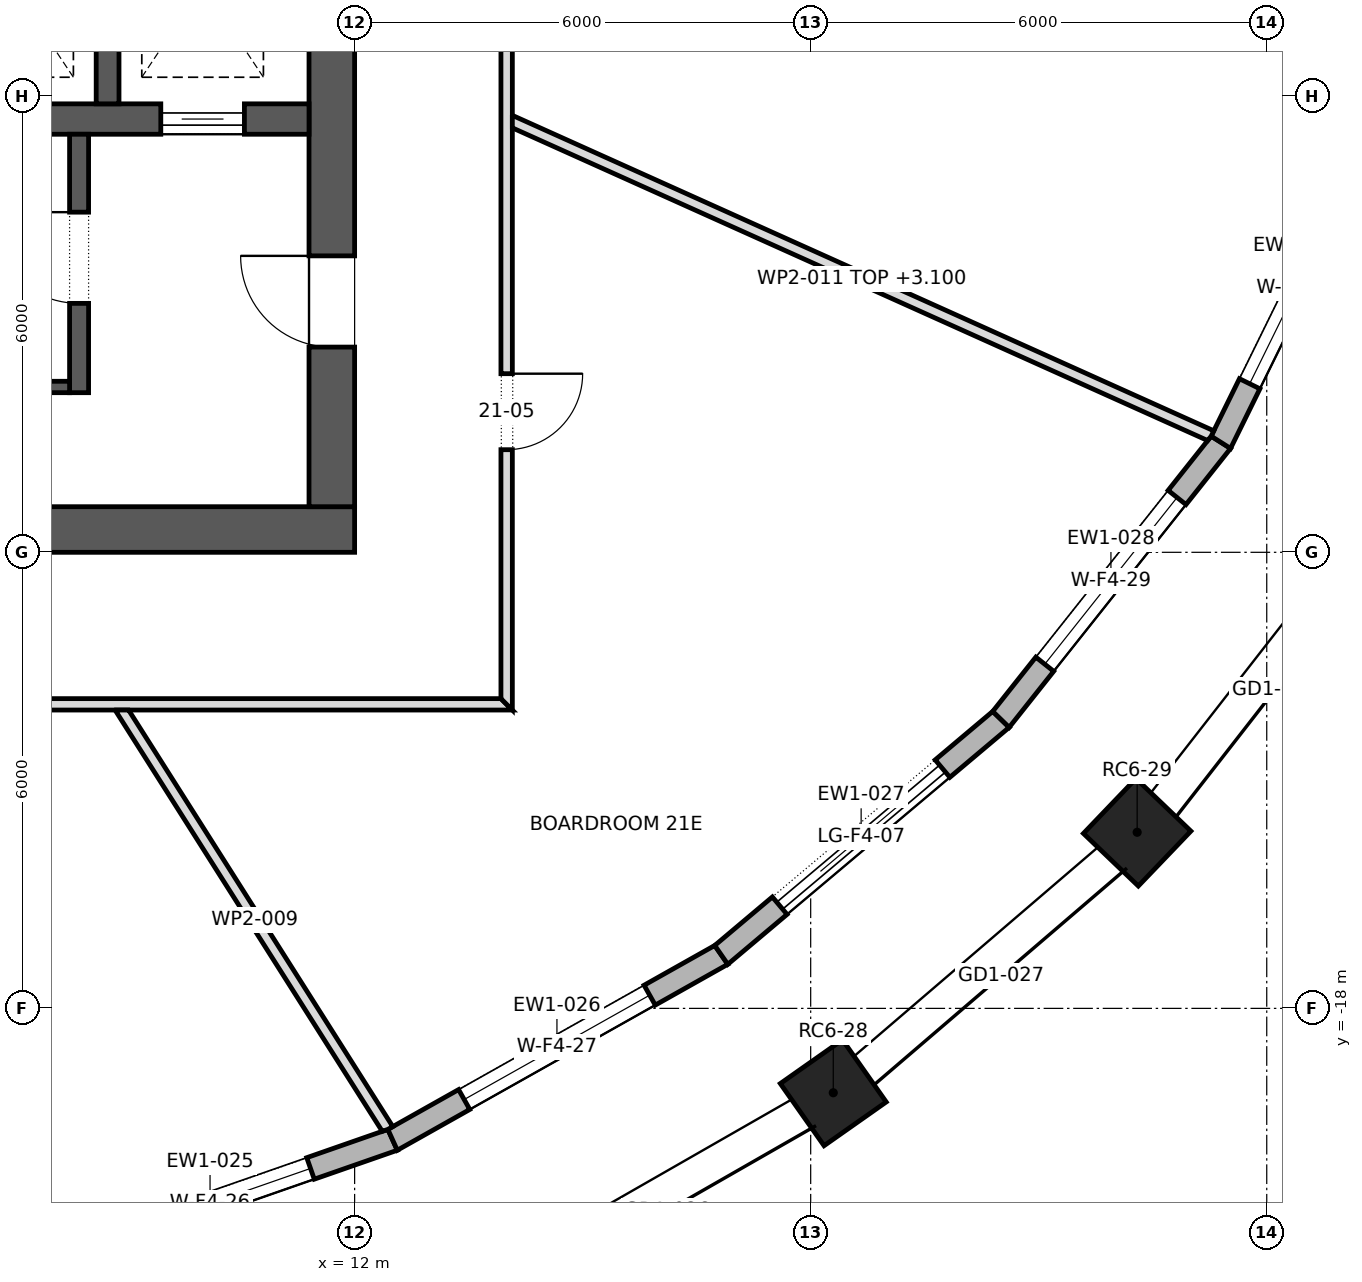
"""IFC4 building model, lengths in metres.
Left out: names, types, materials, properties, quantities, classifications, styles, units other than length and angle.
Written with IfcOpenShell. Run it as: python <this file> out.ifc"""

import sys

from ifc_helpers import new_model, si_unit, direction, frame, frame_2d, origin, origin_2d, place, context, subcontext, project, spatial, polyline, rectangle, outline, extrude, element, fill, save


model = new_model("IFC4")
c1 = context("Model", 3, precision=1e-05, world=origin(), true_north=direction((0.0, 1.0)))
c2 = subcontext(c1, "Body", "Model", "MODEL_VIEW")
j1 = project(units=[si_unit("LENGTHUNIT", "METRE"), si_unit("PLANEANGLEUNIT", "RADIAN")], contexts=[c1])
p1 = place(None, origin())
s1 = spatial("IfcSite", under=j1, at=p1, CompositionType="ELEMENT")
p2 = place(p1, origin())
s2 = spatial("IfcBuilding", under=s1, at=p2, CompositionType="ELEMENT")
p3 = place(p2, frame((0.0, 0.0, 300.3)))
s3 = spatial("IfcBuildingStorey", under=s2, at=p3, CompositionType="ELEMENT", Elevation=300.3)
for number, where, z_axis, x_axis in (
    (1, (18.297, -19.11, 0.0), (0.0, 0.0, 1.0), (0.818, 0.575, 0.0)),
    (2, (22.295, -15.683, 0.0), (0.0, 0.0, 1.0), (0.692, 0.722, 0.0)),
):
    element("IfcColumn", number, at=place(p3, frame(where, z_axis=z_axis, x_axis=x_axis)), inside=s3, PredefinedType="COLUMN", context=c2, shape_type="SweptSolid", body=[
        extrude(rectangle(XDim=1.0, YDim=1.0, at=origin_2d()), origin(), (0.0, 0.0, 1.0), 4.0),
    ])
p4 = place(p3, frame((-12.0, -11.7, 0.0), z_axis=(0.0, 0.0, 1.0), x_axis=(1.0, 0.0, 0.0)))
e3 = element("IfcWall", 3, at=p4, inside=s3, PredefinedType="SHEAR", context=c2, shape_type="SweptSolid", body=[
    extrude(rectangle(XDim=24.0, YDim=0.6, at=frame_2d((12.0, 0.0))), origin(), (0.0, 0.0, 1.0), 4.0),
])
p5 = place(p4, frame((9.975, 0.0, 0.0)))
e4 = element("IfcOpeningElement", 4, at=p5, cuts=e3, PredefinedType="OPENING", context=c2, shape_type="SweptSolid", body=[
    extrude(rectangle(XDim=0.9, YDim=2.1, at=frame_2d((0.45, 1.05))), frame((0.0, 0.312, 0.0), z_axis=(0.0, -1.0, 0.0), x_axis=(1.0, 0.0, 0.0)), (0.0, 0.0, 1.0), 0.624),
])
p6 = place(p4, frame((4.6, 0.0, 0.0)))
e5 = element("IfcOpeningElement", 5, at=p6, cuts=e3, PredefinedType="OPENING", context=c2, shape_type="SweptSolid", body=[
    extrude(rectangle(XDim=0.8, YDim=2.1, at=frame_2d((0.4, 1.05))), frame((0.0, 0.312, 0.0), z_axis=(0.0, -1.0, 0.0), x_axis=(1.0, 0.0, 0.0)), (0.0, 0.0, 1.0), 0.624),
])
p7 = place(p4, frame((7.0, 0.0, 0.0)))
e6 = element("IfcOpeningElement", 6, at=p7, cuts=e3, PredefinedType="OPENING", context=c2, shape_type="SweptSolid", body=[
    extrude(rectangle(XDim=0.8, YDim=2.1, at=frame_2d((0.4, 1.05))), frame((0.0, 0.312, 0.0), z_axis=(0.0, -1.0, 0.0), x_axis=(1.0, 0.0, 0.0)), (0.0, 0.0, 1.0), 0.624),
])
p8 = place(p4, frame((15.85, 0.0, 0.0)))
e7 = element("IfcOpeningElement", 7, at=p8, cuts=e3, PredefinedType="OPENING", context=c2, shape_type="SweptSolid", body=[
    extrude(rectangle(XDim=0.8, YDim=2.1, at=frame_2d((0.4, 1.05))), frame((0.0, 0.312, 0.0), z_axis=(0.0, -1.0, 0.0), x_axis=(1.0, 0.0, 0.0)), (0.0, 0.0, 1.0), 0.624),
])
p9 = place(p3, frame((11.7, -11.4, 0.0), z_axis=(0.0, 0.0, 1.0), x_axis=(0.0, 1.0, 0.0)))
e8 = element("IfcWall", 8, at=p9, inside=s3, PredefinedType="SHEAR", context=c2, shape_type="SweptSolid", body=[
    extrude(rectangle(XDim=22.8, YDim=0.6, at=frame_2d((11.4, 0.0))), origin(), (0.0, 0.0, 1.0), 4.0),
])
p10 = place(p9, frame((10.2, 0.0, 0.0)))
e9 = element("IfcOpeningElement", 9, at=p10, cuts=e8, PredefinedType="OPENING", context=c2, shape_type="SweptSolid", body=[
    extrude(rectangle(XDim=2.4, YDim=2.1, at=frame_2d((1.2, 1.05))), frame((0.0, 0.312, 0.0), z_axis=(0.0, -1.0, 0.0), x_axis=(1.0, 0.0, 0.0)), (0.0, 0.0, 1.0), 0.624),
])
p11 = place(p9, frame((19.5, 0.0, 0.0)))
e10 = element("IfcOpeningElement", 10, at=p11, cuts=e8, PredefinedType="OPENING", context=c2, shape_type="SweptSolid", body=[
    extrude(rectangle(XDim=1.2, YDim=2.1, at=frame_2d((0.6, 1.05))), frame((0.0, 0.312, 0.0), z_axis=(0.0, -1.0, 0.0), x_axis=(1.0, 0.0, 0.0)), (0.0, 0.0, 1.0), 0.624),
])
p12 = place(p9, frame((2.1, 0.0, 0.0)))
e11 = element("IfcOpeningElement", 11, at=p12, cuts=e8, PredefinedType="OPENING", context=c2, shape_type="SweptSolid", body=[
    extrude(rectangle(XDim=1.2, YDim=2.1, at=frame_2d((0.6, 1.05))), frame((0.0, 0.312, 0.0), z_axis=(0.0, -1.0, 0.0), x_axis=(1.0, 0.0, 0.0)), (0.0, 0.0, 1.0), 0.624),
])
p13 = place(p3, frame((-11.4, -6.3, 0.0), z_axis=(0.0, 0.0, 1.0), x_axis=(1.0, 0.0, 0.0)))
e12 = element("IfcWall", 12, at=p13, inside=s3, PredefinedType="SHEAR", context=c2, shape_type="SweptSolid", body=[
    extrude(rectangle(XDim=22.8, YDim=0.4, at=frame_2d((11.4, 0.0))), origin(), (0.0, 0.0, 1.0), 4.0),
])
p14 = place(p13, frame((20.85, 0.0, 0.0)))
e13 = element("IfcOpeningElement", 13, at=p14, cuts=e12, PredefinedType="OPENING", context=c2, shape_type="SweptSolid", body=[
    extrude(rectangle(XDim=1.1, YDim=2.1, at=frame_2d((0.55, 1.05))), frame((0.0, 0.212, 0.0), z_axis=(0.0, -1.0, 0.0), x_axis=(1.0, 0.0, 0.0)), (0.0, 0.0, 1.0), 0.424),
])
p15 = place(p3, frame((8.75, -6.1, 0.0), z_axis=(0.0, 0.0, 1.0), x_axis=(0.0, 1.0, 0.0)))
e14 = element("IfcWall", 14, at=p15, inside=s3, PredefinedType="SHEAR", context=c2, shape_type="SweptSolid", body=[
    extrude(rectangle(XDim=2.9, YDim=0.3, at=frame_2d((1.45, 0.0))), origin(), (0.0, 0.0, 1.0), 4.0),
])
p16 = place(p3, frame((7.696, -21.404, 0.0), z_axis=(0.0, 0.0, 1.0), x_axis=(0.944230376095, 0.329285585564, 0.0)))
e15 = element("IfcWall", 15, at=p16, inside=s3, PredefinedType="STANDARD", context=c2, shape_type="SweptSolid", body=[
    extrude(outline(polyline([(-0.013, -0.15), (5.1, -0.15), (5.073, 0.15), (0.013, 0.15), (-0.013, -0.15)])), origin(), (0.0, 0.0, 1.0), 3.7),
])
p17 = place(p16, frame((1.143, 0.0, 0.6)))
e16 = element("IfcOpeningElement", 16, at=p17, cuts=e15, PredefinedType="OPENING", context=c2, shape_type="SweptSolid", body=[
    extrude(rectangle(XDim=2.8, YDim=2.65, at=frame_2d((1.4, 1.325))), frame((0.0, 0.162, 0.0), z_axis=(0.0, -1.0, 0.0), x_axis=(1.0, 0.0, 0.0)), (0.0, 0.0, 1.0), 0.324),
])
p18 = place(p3, frame((12.5, -19.729, 0.0), z_axis=(0.0, 0.0, 1.0), x_axis=(0.871512454536, 0.490373369575, 0.0)))
e17 = element("IfcWall", 17, at=p18, inside=s3, PredefinedType="STANDARD", context=c2, shape_type="SweptSolid", body=[
    extrude(outline(polyline([(-0.013, -0.15), (4.976, -0.15), (4.948, 0.15), (0.013, 0.15), (-0.013, -0.15)])), origin(), (0.0, 0.0, 1.0), 3.7),
])
p19 = place(p18, frame((1.081, 0.0, 0.6)))
e18 = element("IfcOpeningElement", 18, at=p19, cuts=e17, PredefinedType="OPENING", context=c2, shape_type="SweptSolid", body=[
    extrude(rectangle(XDim=2.8, YDim=2.65, at=frame_2d((1.4, 1.325))), frame((0.0, 0.162, 0.0), z_axis=(0.0, -1.0, 0.0), x_axis=(1.0, 0.0, 0.0)), (0.0, 0.0, 1.0), 0.324),
])
p20 = place(p3, frame((16.824, -17.296, 0.0), z_axis=(0.0, 0.0, 1.0), x_axis=(0.764966473721, 0.644070100286, 0.0)))
e19 = element("IfcWall", 19, at=p20, inside=s3, PredefinedType="STANDARD", context=c2, shape_type="SweptSolid", body=[
    extrude(outline(polyline([(-0.014, -0.15), (4.825, -0.15), (4.795, 0.15), (0.014, 0.15), (-0.014, -0.15)])), origin(), (0.0, 0.0, 1.0), 3.7),
])
p21 = place(p20, frame((1.005, 0.0, 0.0)))
e20 = element("IfcOpeningElement", 20, at=p21, cuts=e19, PredefinedType="OPENING", context=c2, shape_type="SweptSolid", body=[
    extrude(rectangle(XDim=2.8, YDim=3.25, at=frame_2d((1.4, 1.625))), frame((0.0, 0.162, 0.0), z_axis=(0.0, -1.0, 0.0), x_axis=(1.0, 0.0, 0.0)), (0.0, 0.0, 1.0), 0.324),
])
p22 = place(p3, frame((20.503, -14.198, 0.0), z_axis=(0.0, 0.0, 1.0), x_axis=(0.621625671247, 0.783314448256, 0.0)))
e21 = element("IfcWall", 21, at=p22, inside=s3, PredefinedType="STANDARD", context=c2, shape_type="SweptSolid", body=[
    extrude(outline(polyline([(-0.015, -0.15), (4.67, -0.15), (4.637, 0.15), (0.015, 0.15), (-0.015, -0.15)])), origin(), (0.0, 0.0, 1.0), 3.7),
])
p23 = place(p22, frame((0.927, 0.0, 0.6)))
e22 = element("IfcOpeningElement", 22, at=p23, cuts=e21, PredefinedType="OPENING", context=c2, shape_type="SweptSolid", body=[
    extrude(rectangle(XDim=2.8, YDim=2.65, at=frame_2d((1.4, 1.325))), frame((0.0, 0.162, 0.0), z_axis=(0.0, -1.0, 0.0), x_axis=(1.0, 0.0, 0.0)), (0.0, 0.0, 1.0), 0.324),
])
p24 = place(p3, frame((23.396, -10.553, 0.0), z_axis=(0.0, 0.0, 1.0), x_axis=(0.441431671743, 0.897294867467, 0.0)))
e23 = element("IfcWall", 23, at=p24, inside=s3, PredefinedType="STANDARD", context=c2, shape_type="SweptSolid", body=[
    extrude(outline(polyline([(-0.016, -0.15), (4.534, -0.15), (4.5, 0.15), (0.016, 0.15), (-0.016, -0.15)])), origin(), (0.0, 0.0, 1.0), 3.7),
])
p25 = place(p24, frame((0.858, 0.0, 0.6)))
e24 = element("IfcOpeningElement", 24, at=p25, cuts=e23, PredefinedType="OPENING", context=c2, shape_type="SweptSolid", body=[
    extrude(rectangle(XDim=2.8, YDim=2.65, at=frame_2d((1.4, 1.325))), frame((0.0, 0.162, 0.0), z_axis=(0.0, -1.0, 0.0), x_axis=(1.0, 0.0, 0.0)), (0.0, 0.0, 1.0), 0.324),
])
p26 = place(p3, frame((8.375, -9.9, 0.0), z_axis=(0.0, 0.0, 1.0), x_axis=(0.0, 1.0, 0.0)))
e25 = element("IfcWall", 25, at=p26, inside=s3, PredefinedType="SHEAR", context=c2, shape_type="SweptSolid", body=[
    extrude(rectangle(XDim=3.4, YDim=0.25, at=frame_2d((1.7, 0.0))), origin(), (0.0, 0.0, 1.0), 3.7),
])
p27 = place(p26, frame((1.175, 0.0, 0.0)))
e26 = element("IfcOpeningElement", 26, at=p27, cuts=e25, PredefinedType="OPENING", context=c2, shape_type="SweptSolid", body=[
    extrude(rectangle(XDim=1.2, YDim=2.1, at=frame_2d((0.6, 1.05))), frame((0.0, 0.137, 0.0), z_axis=(0.0, -1.0, 0.0), x_axis=(1.0, 0.0, 0.0)), (0.0, 0.0, 1.0), 0.274),
])
p28 = place(p3, frame((0.25, -9.825, 0.0), z_axis=(0.0, 0.0, 1.0), x_axis=(1.0, 0.0, 0.0)))
e27 = element("IfcWall", 27, at=p28, inside=s3, PredefinedType="SHEAR", context=c2, shape_type="SweptSolid", body=[
    extrude(rectangle(XDim=8.0, YDim=0.15, at=frame_2d((4.0, 0.0))), origin(), (0.0, 0.0, 1.0), 3.7),
])
p29 = place(p3, frame((-14.075, -14.0, 0.0), z_axis=(0.0, 0.0, 1.0), x_axis=(1.0, 0.0, 0.0)))
e28 = element("IfcWall", 28, at=p29, inside=s3, PredefinedType="PARTITIONING", context=c2, shape_type="SweptSolid", body=[
    extrude(outline(polyline([(0.0, -0.075), (1.877, -0.075), (3.753, -0.075), (5.63, -0.075), (7.507, -0.075), (9.383, -0.075), (11.26, -0.075), (13.137, -0.075), (15.013, -0.075), (16.89, -0.075), (18.767, -0.075), (20.643, -0.075), (22.52, -0.075), (24.396, -0.075), (26.273, -0.075), (28.15, -0.075), (28.0, 0.075), (26.011, 0.075), (24.021, 0.075), (22.032, 0.075), (20.043, 0.075), (18.053, 0.075), (16.064, 0.075), (14.075, 0.075), (12.086, 0.075), (10.096, 0.075), (8.107, 0.075), (6.118, 0.075), (4.128, 0.075), (2.139, 0.075), (0.15, 0.075), (0.0, -0.075)])), origin(), (0.0, 0.0, 1.0), 3.7),
])
p30 = place(p29, frame((5.93, 0.0, 0.0)))
e29 = element("IfcOpeningElement", 29, at=p30, cuts=e28, PredefinedType="OPENING", context=c2, shape_type="SweptSolid", body=[
    extrude(rectangle(XDim=1.0, YDim=2.1, at=frame_2d((0.5, 1.05))), frame((0.0, 0.087, 0.0), z_axis=(0.0, -1.0, 0.0), x_axis=(1.0, 0.0, 0.0)), (0.0, 0.0, 1.0), 0.174),
])
p31 = place(p29, frame((17.2, 0.0, 0.0)))
e30 = element("IfcOpeningElement", 30, at=p31, cuts=e28, PredefinedType="OPENING", context=c2, shape_type="SweptSolid", body=[
    extrude(rectangle(XDim=1.0, YDim=2.1, at=frame_2d((0.5, 1.05))), frame((0.0, 0.087, 0.0), z_axis=(0.0, -1.0, 0.0), x_axis=(1.0, 0.0, 0.0)), (0.0, 0.0, 1.0), 0.174),
])
p32 = place(p3, frame((8.912, -14.035, 0.0), z_axis=(0.0, 0.0, 1.0), x_axis=(0.535569757711, -0.844490991442, 0.0)))
e31 = element("IfcWall", 31, at=p32, inside=s3, PredefinedType="PARTITIONING", context=c2, shape_type="SweptSolid", body=[
    extrude(outline(polyline([(0.0, -0.075), (1.641, -0.075), (3.281, -0.075), (4.922, -0.075), (6.563, -0.075), (6.581, 0.001), (6.585, 0.073), (6.585, 0.075), (4.962, 0.075), (3.34, 0.075), (1.718, 0.075), (0.095, 0.075), (0.0, -0.075), (0.0, -0.075)])), origin(), (0.0, 0.0, 1.0), 3.7),
])
p33 = place(p3, frame((14.0, -14.075, 0.0), z_axis=(0.0, 0.0, 1.0), x_axis=(0.0, 1.0, 0.0)))
e32 = element("IfcWall", 32, at=p33, inside=s3, PredefinedType="PARTITIONING", context=c2, shape_type="SweptSolid", body=[
    extrude(outline(polyline([(0.0, -0.075), (1.877, -0.075), (3.753, -0.075), (5.63, -0.075), (7.507, -0.075), (9.383, -0.075), (11.26, -0.075), (13.137, -0.075), (15.013, -0.075), (16.89, -0.075), (18.767, -0.075), (20.643, -0.075), (22.52, -0.075), (24.396, -0.075), (26.273, -0.075), (28.15, -0.075), (28.0, 0.075), (26.011, 0.075), (24.021, 0.075), (22.032, 0.075), (20.043, 0.075), (18.053, 0.075), (16.064, 0.075), (14.075, 0.075), (12.086, 0.075), (10.096, 0.075), (8.107, 0.075), (6.118, 0.075), (4.128, 0.075), (2.139, 0.075), (0.15, 0.075), (0.0, -0.075)])), origin(), (0.0, 0.0, 1.0), 3.7),
])
p34 = place(p33, frame((3.425, 0.0, 0.0)))
e33 = element("IfcOpeningElement", 33, at=p34, cuts=e32, PredefinedType="OPENING", context=c2, shape_type="SweptSolid", body=[
    extrude(rectangle(XDim=1.0, YDim=2.1, at=frame_2d((0.5, 1.05))), frame((0.0, 0.087, 0.0), z_axis=(0.0, -1.0, 0.0), x_axis=(1.0, 0.0, 0.0)), (0.0, 0.0, 1.0), 0.174),
])
p35 = place(p33, frame((11.815, 0.0, 0.0)))
e34 = element("IfcOpeningElement", 34, at=p35, cuts=e32, PredefinedType="OPENING", context=c2, shape_type="SweptSolid", body=[
    extrude(rectangle(XDim=1.8, YDim=2.1, at=frame_2d((0.9, 1.05))), frame((0.0, 0.087, 0.0), z_axis=(0.0, -1.0, 0.0), x_axis=(1.0, 0.0, 0.0)), (0.0, 0.0, 1.0), 0.174),
])
p36 = place(p33, frame((21.965, 0.0, 0.0)))
e35 = element("IfcOpeningElement", 35, at=p36, cuts=e32, PredefinedType="OPENING", context=c2, shape_type="SweptSolid", body=[
    extrude(rectangle(XDim=1.8, YDim=2.1, at=frame_2d((0.9, 1.05))), frame((0.0, 0.087, 0.0), z_axis=(0.0, -1.0, 0.0), x_axis=(1.0, 0.0, 0.0)), (0.0, 0.0, 1.0), 0.174),
])
p37 = place(p3, frame((14.045, -6.32, 0.0), z_axis=(0.0, 0.0, 1.0), x_axis=(0.912030730905, -0.410121867114, 0.0)))
e36 = element("IfcWall", 36, at=p37, inside=s3, PredefinedType="PARTITIONING", context=c2, shape_type="SweptSolid", body=[
    extrude(outline(polyline([(0.067, -0.075), (1.739, -0.075), (3.41, -0.075), (5.082, -0.075), (6.754, -0.075), (8.426, -0.075), (10.097, -0.075), (10.115, -0.004), (10.118, 0.073), (10.118, 0.075), (8.432, 0.075), (6.745, 0.075), (5.059, 0.075), (3.373, 0.075), (1.686, 0.075), (0.0, 0.075), (0.0, 0.074), (0.067, -0.075)])), origin(), (0.0, 0.0, 1.0), 3.1),
])
p38 = place(p17, origin())
e37 = element("IfcWindow", 37, at=p38, inside=s3, PartitioningType="DOUBLE_PANEL_VERTICAL", PredefinedType="WINDOW", context=c2, shape_type="SweptSolid", body=[
    extrude(rectangle(XDim=2.8, YDim=2.65, at=frame_2d((1.4, 1.325))), frame((0.0, 0.03, 0.0), z_axis=(0.0, -1.0, 0.0), x_axis=(1.0, 0.0, 0.0)), (0.0, 0.0, 1.0), 0.06),
])
fill(e16, e37)
p39 = place(p19, origin())
e38 = element("IfcWindow", 38, at=p39, inside=s3, PartitioningType="DOUBLE_PANEL_VERTICAL", PredefinedType="WINDOW", context=c2, shape_type="SweptSolid", body=[
    extrude(rectangle(XDim=2.8, YDim=2.65, at=frame_2d((1.4, 1.325))), frame((0.0, 0.03, 0.0), z_axis=(0.0, -1.0, 0.0), x_axis=(1.0, 0.0, 0.0)), (0.0, 0.0, 1.0), 0.06),
])
fill(e18, e38)
p40 = place(p21, origin())
e39 = element("IfcDoor", 39, at=p40, inside=s3, OperationType="DOUBLE_DOOR_SLIDING", PredefinedType="DOOR", context=c2, shape_type="SweptSolid", body=[
    extrude(rectangle(XDim=2.8, YDim=3.25, at=frame_2d((1.4, 1.625))), frame((0.0, 0.025, 0.0), z_axis=(0.0, -1.0, 0.0), x_axis=(1.0, 0.0, 0.0)), (0.0, 0.0, 1.0), 0.05),
])
fill(e20, e39)
p41 = place(p23, origin())
e40 = element("IfcWindow", 40, at=p41, inside=s3, PartitioningType="DOUBLE_PANEL_VERTICAL", PredefinedType="WINDOW", context=c2, shape_type="SweptSolid", body=[
    extrude(rectangle(XDim=2.8, YDim=2.65, at=frame_2d((1.4, 1.325))), frame((0.0, 0.03, 0.0), z_axis=(0.0, -1.0, 0.0), x_axis=(1.0, 0.0, 0.0)), (0.0, 0.0, 1.0), 0.06),
])
fill(e22, e40)
p42 = place(p25, origin())
e41 = element("IfcWindow", 41, at=p42, inside=s3, PartitioningType="DOUBLE_PANEL_VERTICAL", PredefinedType="WINDOW", context=c2, shape_type="SweptSolid", body=[
    extrude(rectangle(XDim=2.8, YDim=2.65, at=frame_2d((1.4, 1.325))), frame((0.0, 0.03, 0.0), z_axis=(0.0, -1.0, 0.0), x_axis=(1.0, 0.0, 0.0)), (0.0, 0.0, 1.0), 0.06),
])
fill(e24, e41)
p43 = place(p14, origin())
e42 = element("IfcDoor", 42, at=p43, inside=s3, OperationType="SLIDING_TO_LEFT", PredefinedType="DOOR", context=c2, shape_type="SweptSolid", body=[
    extrude(rectangle(XDim=1.1, YDim=2.1, at=frame_2d((0.55, 1.05))), frame((0.0, 0.025, 0.0), z_axis=(0.0, -1.0, 0.0), x_axis=(1.0, 0.0, 0.0)), (0.0, 0.0, 1.0), 0.05),
])
fill(e13, e42)
p44 = place(p27, origin())
e43 = element("IfcDoor", 43, at=p44, inside=s3, OperationType="SINGLE_SWING_LEFT", PredefinedType="DOOR", context=c2, shape_type="SweptSolid", body=[
    extrude(rectangle(XDim=1.2, YDim=2.1, at=frame_2d((0.6, 1.05))), frame((0.0, 0.025, 0.0), z_axis=(0.0, -1.0, 0.0), x_axis=(1.0, 0.0, 0.0)), (0.0, 0.0, 1.0), 0.05),
])
fill(e26, e43)
p45 = place(p12, origin())
e44 = element("IfcDoor", 44, at=p45, inside=s3, OperationType="SINGLE_SWING_LEFT", PredefinedType="DOOR", context=c2, shape_type="SweptSolid", body=[
    extrude(rectangle(XDim=1.2, YDim=2.1, at=frame_2d((0.6, 1.05))), frame((0.0, 0.025, 0.0), z_axis=(0.0, -1.0, 0.0), x_axis=(1.0, 0.0, 0.0)), (0.0, 0.0, 1.0), 0.05),
])
fill(e11, e44)
p46 = place(p34, frame((1.0, 0.0, 0.0), z_axis=(0.0, 0.0, 1.0), x_axis=(-1.0, 0.0, 0.0)))
e45 = element("IfcDoor", 45, at=p46, inside=s3, OperationType="SINGLE_SWING_RIGHT", PredefinedType="DOOR", context=c2, shape_type="SweptSolid", body=[
    extrude(rectangle(XDim=1.0, YDim=2.1, at=frame_2d((0.5, 1.05))), frame((0.0, 0.025, 0.0), z_axis=(0.0, -1.0, 0.0), x_axis=(1.0, 0.0, 0.0)), (0.0, 0.0, 1.0), 0.05),
])
fill(e33, e45)
save(model, sys.argv[1])
